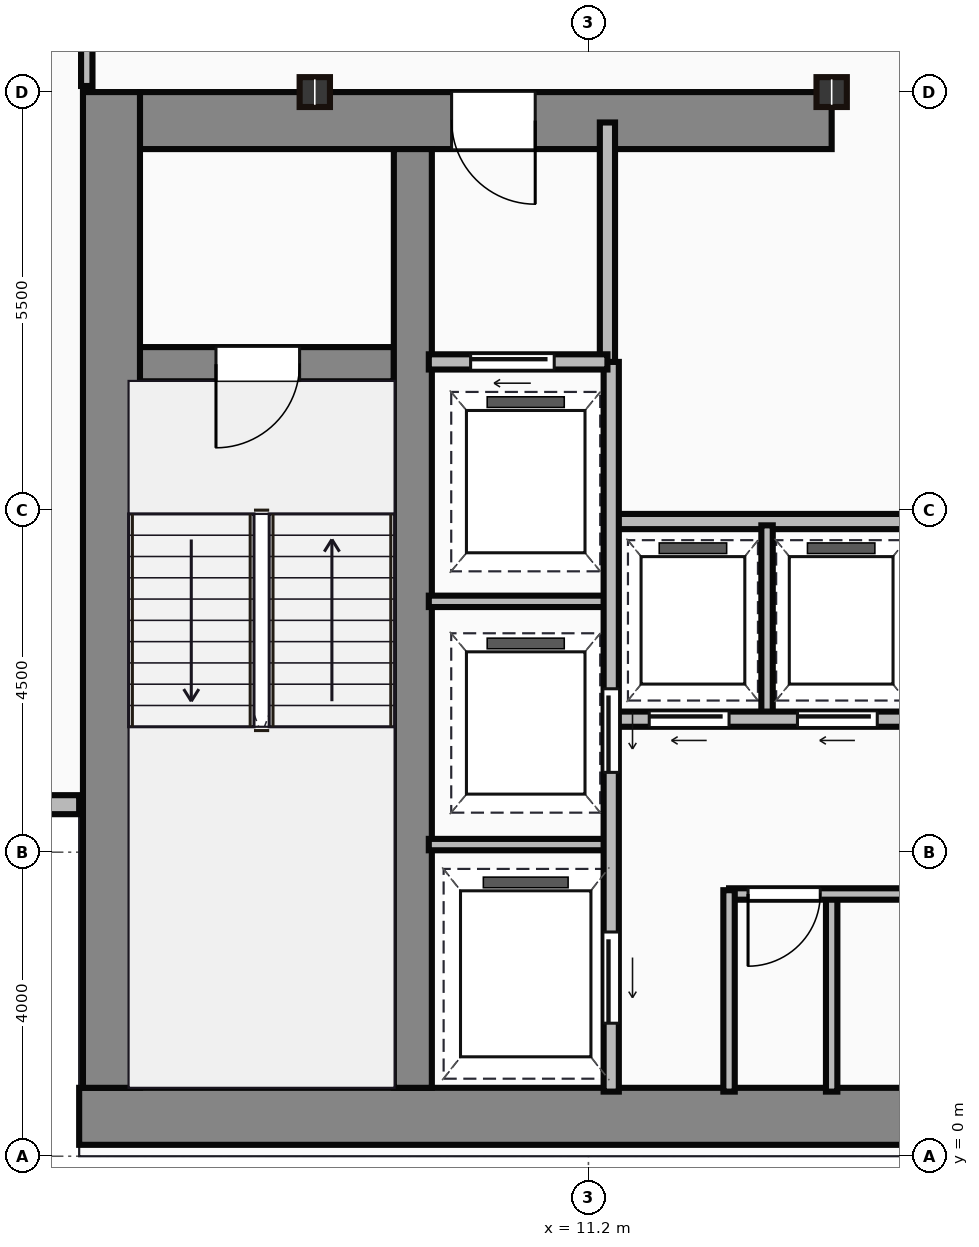
"""IFC4 building model, lengths in metres.
Left out: names, types, materials, properties, quantities, classifications, styles, units other than length and angle.
Written with IfcOpenShell. Run it as: python <this file> out.ifc"""

import sys

from ifc_helpers import new_model, si_unit, direction, frame, frame_2d, origin, origin_2d, place, context, subcontext, project, spatial, rectangle, i_section, extrude, source, transform, mapped, element, fill, save


model = new_model("IFC4")
c1 = context("Model", 3, precision=1e-05, world=origin(), true_north=direction((0.0, 1.0)))
c2 = subcontext(c1, "Body", "Model", "MODEL_VIEW")
j1 = project(units=[si_unit("LENGTHUNIT", "METRE"), si_unit("PLANEANGLEUNIT", "RADIAN")], contexts=[c1])
p1 = place(None, origin())
s1 = spatial("IfcSite", under=j1, at=p1, CompositionType="ELEMENT")
p2 = place(p1, origin())
s2 = spatial("IfcBuilding", under=s1, at=p2, CompositionType="ELEMENT")
p3 = place(p2, frame((0.0, 0.0, 132.45)))
s3 = spatial("IfcBuildingStorey", under=s2, at=p3, CompositionType="ELEMENT", Elevation=132.45)
m1 = source(origin(), c2, "Body", "SweptSolid", [
    extrude(rectangle(XDim=29.5, YDim=0.75, at=frame_2d((14.75, 0.0))), origin(), (0.0, 0.0, 1.0), 3.65),
])
p4 = place(p3, frame((4.5, 0.525, 0.0), z_axis=(0.0, 0.0, 1.0), x_axis=(1.0, 0.0, 0.0)))
e1 = element("IfcWall", 1, at=p4, inside=s3, PredefinedType="SHEAR", context=c2, shape_type="MappedRepresentation", body=[
    mapped(m1, transform((0.0, 0.0, 0.0))),
])
m2 = source(origin(), c2, "Body", "SweptSolid", [
    extrude(rectangle(XDim=13.1, YDim=0.75, at=frame_2d((6.55, 0.0))), origin(), (0.0, 0.0, 1.0), 3.65),
])
p5 = place(p3, frame((4.925, 0.9, 0.0), z_axis=(0.0, 0.0, 1.0), x_axis=(0.0, 1.0, 0.0)))
e2 = element("IfcWall", 2, at=p5, inside=s3, PredefinedType="SHEAR", context=c2, shape_type="MappedRepresentation", body=[
    mapped(m2, transform((0.0, 0.0, 0.0))),
])
m3 = source(origin(), c2, "Body", "SweptSolid", [
    extrude(rectangle(XDim=9.1, YDim=0.75, at=frame_2d((4.55, 0.0))), origin(), (0.0, 0.0, 1.0), 3.65),
])
p6 = place(p3, frame((5.3, 13.625, 0.0), z_axis=(0.0, 0.0, 1.0), x_axis=(1.0, 0.0, 0.0)))
e3 = element("IfcWall", 3, at=p6, inside=s3, PredefinedType="SHEAR", context=c2, shape_type="MappedRepresentation", body=[
    mapped(m3, transform((0.0, 0.0, 0.0))),
])
p7 = place(p6, frame((4.1, 0.0, 0.0)))
e4 = element("IfcOpeningElement", 4, at=p7, cuts=e3, PredefinedType="OPENING", context=c2, shape_type="SweptSolid", body=[
    extrude(rectangle(XDim=1.1, YDim=2.15, at=frame_2d((0.55, 1.075))), frame((0.0, 0.385, 0.0), z_axis=(0.0, -1.0, 0.0), x_axis=(1.0, 0.0, 0.0)), (0.0, 0.0, 1.0), 0.77),
])
m4 = source(origin(), c2, "Body", "SweptSolid", [
    extrude(rectangle(XDim=12.35, YDim=0.5, at=frame_2d((6.175, 0.0))), origin(), (0.0, 0.0, 1.0), 3.65),
])
p8 = place(p3, frame((8.89, 0.9, 0.0), z_axis=(0.0, 0.0, 1.0), x_axis=(0.0, 1.0, 0.0)))
e5 = element("IfcWall", 5, at=p8, inside=s3, PredefinedType="SHEAR", context=c2, shape_type="MappedRepresentation", body=[
    mapped(m4, transform((0.0, 0.0, 0.0))),
])
m5 = source(origin(), c2, "Body", "SweptSolid", [
    extrude(rectangle(XDim=3.39, YDim=0.45, at=frame_2d((1.695, 0.0))), origin(), (0.0, 0.0, 1.0), 3.65),
])
p9 = place(p3, frame((5.25, 10.42, 0.0), z_axis=(0.0, 0.0, 1.0), x_axis=(1.0, 0.0, 0.0)))
e6 = element("IfcWall", 6, at=p9, inside=s3, PredefinedType="SHEAR", context=c2, shape_type="MappedRepresentation", body=[
    mapped(m5, transform((0.0, 0.0, 0.0))),
])
p10 = place(p9, frame((1.05, 0.0, 0.0)))
e7 = element("IfcOpeningElement", 7, at=p10, cuts=e6, PredefinedType="OPENING", context=c2, shape_type="SweptSolid", body=[
    extrude(rectangle(XDim=1.1, YDim=2.15, at=frame_2d((0.55, 1.075))), frame((0.0, 0.235, 0.0), z_axis=(0.0, -1.0, 0.0), x_axis=(1.0, 0.0, 0.0)), (0.0, 0.0, 1.0), 0.47),
])
m6 = source(origin(), c2, "Body", "SweptSolid", [
    extrude(i_section(OverallWidth=0.399, OverallDepth=0.393, WebThickness=0.023, FlangeThickness=0.037, at=origin_2d()), origin(), (0.0, 0.0, 1.0), 3.65),
])
for number, where, z_axis, x_axis in (
    (8, (7.6, 14.0, 0.0), (0.0, 0.0, 1.0), (1.0, 0.0, 0.0)),
    (9, (14.4, 14.0, 0.0), (0.0, 0.0, 1.0), (1.0, 0.0, 0.0)),
):
    element("IfcColumn", number, at=place(p3, frame(where, z_axis=z_axis, x_axis=x_axis)), inside=s3, PredefinedType="COLUMN", context=c2, shape_type="MappedRepresentation", body=[
        mapped(m6, transform((0.0, 0.0, 0.0))),
    ])
m7 = source(origin(), c2, "Body", "SweptSolid", [
    extrude(rectangle(XDim=4.5, YDim=0.25, at=frame_2d((2.25, 0.0))), origin(), (0.0, 0.0, 1.0), 3.35),
])
p11 = place(p3, frame((0.0, 4.625, 0.0), z_axis=(0.0, 0.0, 1.0), x_axis=(1.0, 0.0, 0.0)))
e10 = element("IfcWall", 10, at=p11, inside=s3, PredefinedType="STANDARD", context=c2, shape_type="MappedRepresentation", body=[
    mapped(m7, transform((0.0, 0.0, 0.0))),
])
m8 = source(origin(), c2, "Body", "SweptSolid", [
    extrude(rectangle(XDim=3.18, YDim=0.2, at=frame_2d((1.59, 0.0))), origin(), (0.0, 0.0, 1.0), 3.35),
])
p12 = place(p3, frame((11.45, 10.42, 0.0), z_axis=(0.0, 0.0, 1.0), x_axis=(0.0, 1.0, 0.0)))
e11 = element("IfcWall", 11, at=p12, inside=s3, PredefinedType="PARTITIONING", context=c2, shape_type="MappedRepresentation", body=[
    mapped(m8, transform((0.0, 0.0, 0.0))),
])
m9 = source(origin(), c2, "Body", "SweptSolid", [
    extrude(rectangle(XDim=2.35, YDim=0.2, at=frame_2d((1.175, 0.0))), origin(), (0.0, 0.0, 1.0), 3.35),
])
p13 = place(p3, frame((9.1, 10.45, 0.0), z_axis=(0.0, 0.0, 1.0), x_axis=(1.0, 0.0, 0.0)))
e12 = element("IfcWall", 12, at=p13, inside=s3, PredefinedType="PARTITIONING", context=c2, shape_type="MappedRepresentation", body=[
    mapped(m9, transform((0.0, 0.0, 0.0))),
])
p14 = place(p13, frame((0.55, 0.0, 0.0)))
e13 = element("IfcOpeningElement", 13, at=p14, cuts=e12, PredefinedType="OPENING", context=c2, shape_type="SweptSolid", body=[
    extrude(rectangle(XDim=1.1, YDim=2.15, at=frame_2d((0.55, 1.075))), frame((0.0, 0.11, 0.0), z_axis=(0.0, -1.0, 0.0), x_axis=(1.0, 0.0, 0.0)), (0.0, 0.0, 1.0), 0.22),
])
m10 = source(origin(), c2, "Body", "SweptSolid", [
    extrude(rectangle(XDim=9.6, YDim=0.2, at=frame_2d((4.8, 0.0))), origin(), (0.0, 0.0, 1.0), 3.35),
])
p15 = place(p3, frame((11.5, 0.85, 0.0), z_axis=(0.0, 0.0, 1.0), x_axis=(0.0, 1.0, 0.0)))
e14 = element("IfcWall", 14, at=p15, inside=s3, PredefinedType="PARTITIONING", context=c2, shape_type="MappedRepresentation", body=[
    mapped(m10, transform((0.0, 0.0, 0.0))),
])
p16 = place(p15, frame((4.2, 0.0, 0.0)))
e15 = element("IfcOpeningElement", 15, at=p16, cuts=e14, PredefinedType="OPENING", context=c2, shape_type="SweptSolid", body=[
    extrude(rectangle(XDim=1.1, YDim=2.15, at=frame_2d((0.55, 1.075))), frame((0.0, 0.11, 0.0), z_axis=(0.0, -1.0, 0.0), x_axis=(1.0, 0.0, 0.0)), (0.0, 0.0, 1.0), 0.22),
])
p17 = place(p15, frame((0.9, 0.0, 0.0)))
e16 = element("IfcOpeningElement", 16, at=p17, cuts=e14, PredefinedType="OPENING", context=c2, shape_type="SweptSolid", body=[
    extrude(rectangle(XDim=1.2, YDim=2.15, at=frame_2d((0.6, 1.075))), frame((0.0, 0.11, 0.0), z_axis=(0.0, -1.0, 0.0), x_axis=(1.0, 0.0, 0.0)), (0.0, 0.0, 1.0), 0.22),
])
m11 = source(origin(), c2, "Body", "SweptSolid", [
    extrude(rectangle(XDim=2.4, YDim=0.15, at=frame_2d((1.2, 0.0))), origin(), (0.0, 0.0, 1.0), 3.35),
])
for number, where, z_axis, x_axis in (
    (17, (9.1, 4.1, 0.0), (0.0, 0.0, 1.0), (1.0, 0.0, 0.0)),
    (18, (9.1, 7.3, 0.0), (0.0, 0.0, 1.0), (1.0, 0.0, 0.0)),
):
    element("IfcWall", number, at=place(p3, frame(where, z_axis=z_axis, x_axis=x_axis)), inside=s3, PredefinedType="PARTITIONING", context=c2, shape_type="MappedRepresentation", body=[
        mapped(m11, transform((0.0, 0.0, 0.0))),
    ])
m12 = source(origin(), c2, "Body", "SweptSolid", [
    extrude(rectangle(XDim=2.65, YDim=0.15, at=frame_2d((1.325, 0.0))), origin(), (0.0, 0.0, 1.0), 3.35),
])
p18 = place(p3, frame((13.05, 0.85, 0.0), z_axis=(0.0, 0.0, 1.0), x_axis=(0.0, 1.0, 0.0)))
e19 = element("IfcWall", 19, at=p18, inside=s3, PredefinedType="PARTITIONING", context=c2, shape_type="MappedRepresentation", body=[
    mapped(m12, transform((0.0, 0.0, 0.0))),
])
m13 = source(origin(), c2, "Body", "SweptSolid", [
    extrude(rectangle(XDim=10.35, YDim=0.15, at=frame_2d((5.175, 0.0))), origin(), (0.0, 0.0, 1.0), 3.35),
])
p19 = place(p3, frame((13.05, 3.45, 0.0), z_axis=(0.0, 0.0, 1.0), x_axis=(1.0, 0.0, 0.0)))
e20 = element("IfcWall", 20, at=p19, inside=s3, PredefinedType="PARTITIONING", context=c2, shape_type="MappedRepresentation", body=[
    mapped(m13, transform((0.0, 0.0, 0.0))),
])
p20 = place(p19, frame((0.25, 0.0, 0.0)))
e21 = element("IfcOpeningElement", 21, at=p20, cuts=e20, PredefinedType="OPENING", context=c2, shape_type="SweptSolid", body=[
    extrude(rectangle(XDim=0.95, YDim=2.15, at=frame_2d((0.475, 1.075))), frame((0.0, 0.085, 0.0), z_axis=(0.0, -1.0, 0.0), x_axis=(1.0, 0.0, 0.0)), (0.0, 0.0, 1.0), 0.17),
])
p21 = place(p19, frame((6.8, 0.0, 0.0)))
e22 = element("IfcOpeningElement", 22, at=p21, cuts=e20, PredefinedType="OPENING", context=c2, shape_type="SweptSolid", body=[
    extrude(rectangle(XDim=0.95, YDim=2.15, at=frame_2d((0.475, 1.075))), frame((0.0, 0.085, 0.0), z_axis=(0.0, -1.0, 0.0), x_axis=(1.0, 0.0, 0.0)), (0.0, 0.0, 1.0), 0.17),
])
m14 = source(origin(), c2, "Body", "SweptSolid", [
    extrude(rectangle(XDim=2.6, YDim=0.15, at=frame_2d((1.3, 0.0))), origin(), (0.0, 0.0, 1.0), 3.35),
])
p22 = place(p3, frame((14.4, 0.85, 0.0), z_axis=(0.0, 0.0, 1.0), x_axis=(0.0, 1.0, 0.0)))
e23 = element("IfcWall", 23, at=p22, inside=s3, PredefinedType="PARTITIONING", context=c2, shape_type="MappedRepresentation", body=[
    mapped(m14, transform((0.0, 0.0, 0.0))),
])
m15 = source(origin(), c2, "Body", "SweptSolid", [
    extrude(rectangle(XDim=11.85, YDim=0.2, at=frame_2d((5.925, 0.0))), origin(), (0.0, 0.0, 1.0), 3.35),
])
p23 = place(p3, frame((11.55, 5.75, 0.0), z_axis=(0.0, 0.0, 1.0), x_axis=(1.0, 0.0, 0.0)))
e24 = element("IfcWall", 24, at=p23, inside=s3, PredefinedType="PARTITIONING", context=c2, shape_type="MappedRepresentation", body=[
    mapped(m15, transform((0.0, 0.0, 0.0))),
])
p24 = place(p23, frame((0.45, 0.0, 0.0)))
e25 = element("IfcOpeningElement", 25, at=p24, cuts=e24, PredefinedType="OPENING", context=c2, shape_type="SweptSolid", body=[
    extrude(rectangle(XDim=1.05, YDim=2.15, at=frame_2d((0.525, 1.075))), frame((0.0, 0.11, 0.0), z_axis=(0.0, -1.0, 0.0), x_axis=(1.0, 0.0, 0.0)), (0.0, 0.0, 1.0), 0.22),
])
p25 = place(p23, frame((2.4, 0.0, 0.0)))
e26 = element("IfcOpeningElement", 26, at=p25, cuts=e24, PredefinedType="OPENING", context=c2, shape_type="SweptSolid", body=[
    extrude(rectangle(XDim=1.05, YDim=2.15, at=frame_2d((0.525, 1.075))), frame((0.0, 0.11, 0.0), z_axis=(0.0, -1.0, 0.0), x_axis=(1.0, 0.0, 0.0)), (0.0, 0.0, 1.0), 0.22),
])
p26 = place(p23, frame((4.35, 0.0, 0.0)))
e27 = element("IfcOpeningElement", 27, at=p26, cuts=e24, PredefinedType="OPENING", context=c2, shape_type="SweptSolid", body=[
    extrude(rectangle(XDim=1.05, YDim=2.15, at=frame_2d((0.525, 1.075))), frame((0.0, 0.11, 0.0), z_axis=(0.0, -1.0, 0.0), x_axis=(1.0, 0.0, 0.0)), (0.0, 0.0, 1.0), 0.22),
])
p27 = place(p23, frame((6.3, 0.0, 0.0)))
e28 = element("IfcOpeningElement", 28, at=p27, cuts=e24, PredefinedType="OPENING", context=c2, shape_type="SweptSolid", body=[
    extrude(rectangle(XDim=1.05, YDim=2.15, at=frame_2d((0.525, 1.075))), frame((0.0, 0.11, 0.0), z_axis=(0.0, -1.0, 0.0), x_axis=(1.0, 0.0, 0.0)), (0.0, 0.0, 1.0), 0.22),
])
p28 = place(p23, frame((8.25, 0.0, 0.0)))
e29 = element("IfcOpeningElement", 29, at=p28, cuts=e24, PredefinedType="OPENING", context=c2, shape_type="SweptSolid", body=[
    extrude(rectangle(XDim=1.05, YDim=2.15, at=frame_2d((0.525, 1.075))), frame((0.0, 0.11, 0.0), z_axis=(0.0, -1.0, 0.0), x_axis=(1.0, 0.0, 0.0)), (0.0, 0.0, 1.0), 0.22),
])
p29 = place(p23, frame((10.2, 0.0, 0.0)))
e30 = element("IfcOpeningElement", 30, at=p29, cuts=e24, PredefinedType="OPENING", context=c2, shape_type="SweptSolid", body=[
    extrude(rectangle(XDim=1.05, YDim=2.15, at=frame_2d((0.525, 1.075))), frame((0.0, 0.11, 0.0), z_axis=(0.0, -1.0, 0.0), x_axis=(1.0, 0.0, 0.0)), (0.0, 0.0, 1.0), 0.22),
])
p30 = place(p3, frame((11.55, 8.35, 0.0), z_axis=(0.0, 0.0, 1.0), x_axis=(1.0, 0.0, 0.0)))
e31 = element("IfcWall", 31, at=p30, inside=s3, PredefinedType="PARTITIONING", context=c2, shape_type="MappedRepresentation", body=[
    mapped(m15, transform((0.0, 0.0, 0.0))),
])
m16 = source(origin(), c2, "Body", "SweptSolid", [
    extrude(rectangle(XDim=2.5, YDim=0.15, at=frame_2d((1.25, 0.0))), origin(), (0.0, 0.0, 1.0), 3.35),
])
p31 = place(p3, frame((13.55, 5.8, 0.0), z_axis=(0.0, 0.0, 1.0), x_axis=(0.0, 1.0, 0.0)))
e32 = element("IfcWall", 32, at=p31, inside=s3, PredefinedType="PARTITIONING", context=c2, shape_type="MappedRepresentation", body=[
    mapped(m16, transform((0.0, 0.0, 0.0))),
])
m17 = source(origin(), c2, "Body", "SweptSolid", [
    extrude(rectangle(XDim=2.22, YDim=0.15, at=frame_2d((1.11, 0.0))), origin(), (0.0, 0.0, 1.0), 3.35),
])
p32 = place(p3, frame((4.6, 14.08, 0.0), z_axis=(0.0, 0.0, 1.0), x_axis=(0.0, 1.0, 0.0)))
e33 = element("IfcWall", 33, at=p32, inside=s3, PredefinedType="PARTITIONING", context=c2, shape_type="MappedRepresentation", body=[
    mapped(m17, transform((0.0, 0.0, 0.0))),
])
m18 = source(origin(), c2, "Body", "SweptSolid", [
    extrude(rectangle(XDim=1.1, YDim=2.15, at=frame_2d((0.55, 1.075))), frame((0.0, 0.025, 0.0), z_axis=(0.0, -1.0, 0.0), x_axis=(1.0, 0.0, 0.0)), (0.0, 0.0, 1.0), 0.05),
])
p33 = place(p10, frame((1.1, 0.0, 0.0), z_axis=(0.0, 0.0, 1.0), x_axis=(-1.0, 0.0, 0.0)))
e34 = element("IfcDoor", 34, at=p33, inside=s3, OperationType="SINGLE_SWING_LEFT", PredefinedType="DOOR", context=c2, shape_type="MappedRepresentation", body=[
    mapped(m18, transform((0.0, 0.0, 0.0))),
])
fill(e7, e34)
p34 = place(p7, origin())
e35 = element("IfcDoor", 35, at=p34, inside=s3, OperationType="SINGLE_SWING_RIGHT", PredefinedType="DOOR", context=c2, shape_type="MappedRepresentation", body=[
    mapped(m18, transform((0.0, 0.0, 0.0))),
])
fill(e4, e35)
p35 = place(p14, origin())
e36 = element("IfcDoor", 36, at=p35, inside=s3, OperationType="SLIDING_TO_LEFT", PredefinedType="DOOR", context=c2, shape_type="MappedRepresentation", body=[
    mapped(m18, transform((0.0, 0.0, 0.0))),
])
fill(e13, e36)
p36 = place(p16, frame((1.1, 0.0, 0.0), z_axis=(0.0, 0.0, 1.0), x_axis=(-1.0, 0.0, 0.0)))
e37 = element("IfcDoor", 37, at=p36, inside=s3, OperationType="SLIDING_TO_LEFT", PredefinedType="DOOR", context=c2, shape_type="MappedRepresentation", body=[
    mapped(m18, transform((0.0, 0.0, 0.0))),
])
fill(e15, e37)
m19 = source(origin(), c2, "Body", "SweptSolid", [
    extrude(rectangle(XDim=1.2, YDim=2.15, at=frame_2d((0.6, 1.075))), frame((0.0, 0.025, 0.0), z_axis=(0.0, -1.0, 0.0), x_axis=(1.0, 0.0, 0.0)), (0.0, 0.0, 1.0), 0.05),
])
p37 = place(p17, frame((1.2, 0.0, 0.0), z_axis=(0.0, 0.0, 1.0), x_axis=(-1.0, 0.0, 0.0)))
e38 = element("IfcDoor", 38, at=p37, inside=s3, OperationType="SLIDING_TO_LEFT", PredefinedType="DOOR", context=c2, shape_type="MappedRepresentation", body=[
    mapped(m19, transform((0.0, 0.0, 0.0))),
])
fill(e16, e38)
m20 = source(origin(), c2, "Body", "SweptSolid", [
    extrude(rectangle(XDim=0.95, YDim=2.15, at=frame_2d((0.475, 1.075))), frame((0.0, 0.025, 0.0), z_axis=(0.0, -1.0, 0.0), x_axis=(1.0, 0.0, 0.0)), (0.0, 0.0, 1.0), 0.05),
])
p38 = place(p20, origin())
e39 = element("IfcDoor", 39, at=p38, inside=s3, OperationType="SINGLE_SWING_LEFT", PredefinedType="DOOR", context=c2, shape_type="MappedRepresentation", body=[
    mapped(m20, transform((0.0, 0.0, 0.0))),
])
fill(e21, e39)
m21 = source(origin(), c2, "Body", "SweptSolid", [
    extrude(rectangle(XDim=1.05, YDim=2.15, at=frame_2d((0.525, 1.075))), frame((0.0, 0.025, 0.0), z_axis=(0.0, -1.0, 0.0), x_axis=(1.0, 0.0, 0.0)), (0.0, 0.0, 1.0), 0.05),
])
p39 = place(p24, frame((1.05, 0.0, 0.0), z_axis=(0.0, 0.0, 1.0), x_axis=(-1.0, 0.0, 0.0)))
e40 = element("IfcDoor", 40, at=p39, inside=s3, OperationType="SLIDING_TO_LEFT", PredefinedType="DOOR", context=c2, shape_type="MappedRepresentation", body=[
    mapped(m21, transform((0.0, 0.0, 0.0))),
])
fill(e25, e40)
p40 = place(p25, frame((1.05, 0.0, 0.0), z_axis=(0.0, 0.0, 1.0), x_axis=(-1.0, 0.0, 0.0)))
e41 = element("IfcDoor", 41, at=p40, inside=s3, OperationType="SLIDING_TO_LEFT", PredefinedType="DOOR", context=c2, shape_type="MappedRepresentation", body=[
    mapped(m21, transform((0.0, 0.0, 0.0))),
])
fill(e26, e41)
save(model, sys.argv[1])
